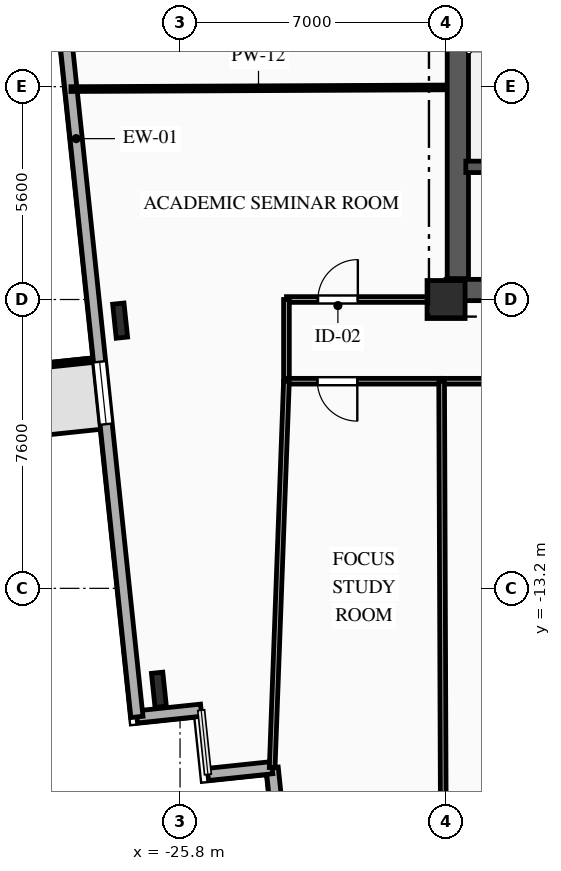
"""IFC4 building model, lengths in metres.
Left out: names, types, materials, properties, quantities, classifications, styles, units other than length and angle.
Written with IfcOpenShell. Run it as: python <this file> out.ifc"""

import sys

from ifc_helpers import new_model, si_unit, direction, frame, frame_2d, origin, origin_2d, place, context, subcontext, project, spatial, rectangle, i_section, extrude, element, fill, save


model = new_model("IFC4")
c1 = context("Model", 3, precision=1e-05, world=origin(), true_north=direction((0.0, 1.0)))
c2 = subcontext(c1, "Body", "Model", "MODEL_VIEW")
j1 = project(units=[si_unit("LENGTHUNIT", "METRE"), si_unit("PLANEANGLEUNIT", "RADIAN")], contexts=[c1])
p1 = place(None, origin())
s1 = spatial("IfcSite", under=j1, at=p1, CompositionType="ELEMENT")
p2 = place(p1, origin())
s2 = spatial("IfcBuilding", under=s1, at=p2, CompositionType="ELEMENT")
p3 = place(p2, frame((0.0, 0.0, 92.4)))
s3 = spatial("IfcBuildingStorey", under=s2, at=p3, CompositionType="ELEMENT", Elevation=92.4)
p4 = place(p3, frame((-18.8, -5.6, 0.0), z_axis=(0.0, 0.0, 1.0), x_axis=(1.0, 0.0, 0.0)))
e1 = element("IfcColumn", 1, at=p4, inside=s3, PredefinedType="COLUMN", context=c2, shape_type="SweptSolid", body=[
    extrude(rectangle(XDim=1.0, YDim=1.0, at=origin_2d()), origin(), (0.0, 0.0, 1.0), 3.35),
])
for number, where, z_axis, x_axis in (
    (2, (-27.377, -6.156, 0.0), (0.0, 0.0, 1.0), (0.995, 0.105, 0.0)),
    (3, (-26.356, -15.869, 0.0), (0.0, 0.0, 1.0), (0.995, 0.105, 0.0)),
):
    element("IfcColumn", number, at=place(p3, frame(where, z_axis=z_axis, x_axis=x_axis)), inside=s3, PredefinedType="COLUMN", context=c2, shape_type="SweptSolid", body=[
        extrude(i_section(OverallWidth=0.3, OverallDepth=0.9, WebThickness=0.019, FlangeThickness=0.035, FilletRadius=0.03, at=origin_2d()), origin(), (0.0, 0.0, 1.0), 3.35),
    ])
for number, where, z_axis, x_axis in (
    (4, (-23.198, -19.609, 0.0), (0.0, 0.0, 1.0), (-0.105, 0.995, 0.0)),
    (5, (-23.376, -17.919, 0.0), (0.0, 0.0, 1.0), (-0.995, -0.105, 0.0)),
):
    element("IfcWall", number, at=place(p3, frame(where, z_axis=z_axis, x_axis=x_axis)), inside=s3, PredefinedType="SOLIDWALL", context=c2, shape_type="SweptSolid", body=[
        extrude(rectangle(XDim=1.7, YDim=0.32, at=frame_2d((0.85, 0.0))), origin(), (0.0, 0.0, 1.0), 3.045),
    ])
p5 = place(p3, frame((-25.244, -16.406, 0.0), z_axis=(0.0, 0.0, 1.0), x_axis=(-0.994521177842, -0.104535289845, 0.0)))
e6 = element("IfcWall", 6, at=p5, inside=s3, PredefinedType="SOLIDWALL", context=c2, shape_type="SweptSolid", body=[
    extrude(rectangle(XDim=1.7, YDim=0.32, at=frame_2d((0.85, 0.0))), origin(), (0.0, 0.0, 1.0), 3.045),
])
p6 = place(p3, frame((-26.935, -16.583, 0.0), z_axis=(0.0, 0.0, 1.0), x_axis=(-0.104524887486, 0.994522271192, 0.0)))
e7 = element("IfcWall", 7, at=p6, inside=s3, PredefinedType="SOLIDWALL", context=c2, shape_type="SweptSolid", body=[
    extrude(rectangle(XDim=30.6, YDim=0.32, at=frame_2d((15.3, 0.0))), origin(), (0.0, 0.0, 1.0), 3.045),
])
p7 = place(p6, frame((7.746, 0.0, 0.85)))
e8 = element("IfcOpeningElement", 8, at=p7, cuts=e7, PredefinedType="OPENING", context=c2, shape_type="SweptSolid", body=[
    extrude(rectangle(XDim=1.65, YDim=1.85, at=frame_2d((0.825, 0.925))), frame((0.0, 0.17, 0.0), z_axis=(0.0, -1.0, 0.0), x_axis=(1.0, 0.0, 0.0)), (0.0, 0.0, 1.0), 0.34),
])
p8 = place(p6, frame((22.631, 0.0, 0.85)))
e9 = element("IfcOpeningElement", 9, at=p8, cuts=e7, PredefinedType="OPENING", context=c2, shape_type="SweptSolid", body=[
    extrude(rectangle(XDim=1.6, YDim=1.85, at=frame_2d((0.8, 0.925))), frame((0.0, 0.17, 0.0), z_axis=(0.0, -1.0, 0.0), x_axis=(1.0, 0.0, 0.0)), (0.0, 0.0, 1.0), 0.34),
])
p9 = place(p3, frame((30.307, -13.986, 0.0), z_axis=(0.0, 0.0, 1.0), x_axis=(-0.994521628355, -0.104531003701, 0.0)))
e10 = element("IfcWall", 10, at=p9, inside=s3, PredefinedType="SOLIDWALL", context=c2, shape_type="SweptSolid", body=[
    extrude(rectangle(XDim=53.8, YDim=0.32, at=frame_2d((26.9, 0.0))), origin(), (0.0, 0.0, 1.0), 3.045),
])
p10 = place(p9, frame((1.657, 0.0, 0.85)))
e11 = element("IfcOpeningElement", 11, at=p10, cuts=e10, PredefinedType="OPENING", context=c2, shape_type="SweptSolid", body=[
    extrude(rectangle(XDim=1.65, YDim=1.85, at=frame_2d((0.825, 0.925))), frame((0.0, 0.17, 0.0), z_axis=(0.0, -1.0, 0.0), x_axis=(1.0, 0.0, 0.0)), (0.0, 0.0, 1.0), 0.34),
])
p11 = place(p9, frame((5.099, 0.0, 0.85)))
e12 = element("IfcOpeningElement", 12, at=p11, cuts=e10, PredefinedType="OPENING", context=c2, shape_type="SweptSolid", body=[
    extrude(rectangle(XDim=1.65, YDim=1.85, at=frame_2d((0.825, 0.925))), frame((0.0, 0.17, 0.0), z_axis=(0.0, -1.0, 0.0), x_axis=(1.0, 0.0, 0.0)), (0.0, 0.0, 1.0), 0.34),
])
p12 = place(p9, frame((10.143, 0.0, 0.85)))
e13 = element("IfcOpeningElement", 13, at=p12, cuts=e10, PredefinedType="OPENING", context=c2, shape_type="SweptSolid", body=[
    extrude(rectangle(XDim=1.65, YDim=1.85, at=frame_2d((0.825, 0.925))), frame((0.0, 0.17, 0.0), z_axis=(0.0, -1.0, 0.0), x_axis=(1.0, 0.0, 0.0)), (0.0, 0.0, 1.0), 0.34),
])
p13 = place(p9, frame((17.314, 0.0, 0.85)))
e14 = element("IfcOpeningElement", 14, at=p13, cuts=e10, PredefinedType="OPENING", context=c2, shape_type="SweptSolid", body=[
    extrude(rectangle(XDim=2.2, YDim=1.85, at=frame_2d((1.1, 0.925))), frame((0.0, 0.17, 0.0), z_axis=(0.0, -1.0, 0.0), x_axis=(1.0, 0.0, 0.0)), (0.0, 0.0, 1.0), 0.34),
])
p14 = place(p9, frame((25.0, 0.0, 0.85)))
e15 = element("IfcOpeningElement", 15, at=p14, cuts=e10, PredefinedType="OPENING", context=c2, shape_type="SweptSolid", body=[
    extrude(rectangle(XDim=2.2, YDim=1.85, at=frame_2d((1.1, 0.925))), frame((0.0, 0.17, 0.0), z_axis=(0.0, -1.0, 0.0), x_axis=(1.0, 0.0, 0.0)), (0.0, 0.0, 1.0), 0.34),
])
p15 = place(p9, frame((32.685, 0.0, 0.85)))
e16 = element("IfcOpeningElement", 16, at=p15, cuts=e10, PredefinedType="OPENING", context=c2, shape_type="SweptSolid", body=[
    extrude(rectangle(XDim=2.2, YDim=1.85, at=frame_2d((1.1, 0.925))), frame((0.0, 0.17, 0.0), z_axis=(0.0, -1.0, 0.0), x_axis=(1.0, 0.0, 0.0)), (0.0, 0.0, 1.0), 0.34),
])
p16 = place(p9, frame((40.411, 0.0, 0.85)))
e17 = element("IfcOpeningElement", 17, at=p16, cuts=e10, PredefinedType="OPENING", context=c2, shape_type="SweptSolid", body=[
    extrude(rectangle(XDim=2.2, YDim=1.85, at=frame_2d((1.1, 0.925))), frame((0.0, 0.17, 0.0), z_axis=(0.0, -1.0, 0.0), x_axis=(1.0, 0.0, 0.0)), (0.0, 0.0, 1.0), 0.34),
])
p17 = place(p9, frame((46.61, 0.0, 0.85)))
e18 = element("IfcOpeningElement", 18, at=p17, cuts=e10, PredefinedType="OPENING", context=c2, shape_type="SweptSolid", body=[
    extrude(rectangle(XDim=1.65, YDim=1.85, at=frame_2d((0.825, 0.925))), frame((0.0, 0.17, 0.0), z_axis=(0.0, -1.0, 0.0), x_axis=(1.0, 0.0, 0.0)), (0.0, 0.0, 1.0), 0.34),
])
p18 = place(p9, frame((50.613, 0.0, 0.85)))
e19 = element("IfcOpeningElement", 19, at=p18, cuts=e10, PredefinedType="OPENING", context=c2, shape_type="SweptSolid", body=[
    extrude(rectangle(XDim=1.65, YDim=1.85, at=frame_2d((0.825, 0.925))), frame((0.0, 0.17, 0.0), z_axis=(0.0, -1.0, 0.0), x_axis=(1.0, 0.0, 0.0)), (0.0, 0.0, 1.0), 0.34),
])
p19 = place(p3, frame((-18.8, -5.35, 0.0), z_axis=(0.0, 0.0, 1.0), x_axis=(1.0, 0.0, 0.0)))
e20 = element("IfcWall", 20, at=p19, inside=s3, PredefinedType="SHEAR", context=c2, shape_type="SweptSolid", body=[
    extrude(rectangle(XDim=9.6, YDim=0.56, at=frame_2d((4.8, 0.0))), origin(), (0.0, 0.0, 1.0), 3.045),
])
p20 = place(p19, frame((1.05, 0.0, 0.0)))
e21 = element("IfcOpeningElement", 21, at=p20, cuts=e20, PredefinedType="OPENING", context=c2, shape_type="SweptSolid", body=[
    extrude(rectangle(XDim=0.9, YDim=2.1, at=frame_2d((0.45, 1.05))), frame((0.0, 0.29, 0.0), z_axis=(0.0, -1.0, 0.0), x_axis=(1.0, 0.0, 0.0)), (0.0, 0.0, 1.0), 0.58),
])
p21 = place(p3, frame((-18.49, -5.05, 0.0), z_axis=(0.0, 0.0, 1.0), x_axis=(0.0, 1.0, 0.0)))
e22 = element("IfcWall", 22, at=p21, inside=s3, PredefinedType="SHEAR", context=c2, shape_type="SweptSolid", body=[
    extrude(rectangle(XDim=10.1, YDim=0.56, at=frame_2d((5.05, 0.0))), origin(), (0.0, 0.0, 1.0), 3.045),
])
p22 = place(p3, frame((-18.28, -2.11, 0.0), z_axis=(0.0, 0.0, 1.0), x_axis=(1.0, 0.0, 0.0)))
e23 = element("IfcWall", 23, at=p22, inside=s3, PredefinedType="SHEAR", context=c2, shape_type="SweptSolid", body=[
    extrude(rectangle(XDim=3.18, YDim=0.3, at=frame_2d((1.59, 0.0))), origin(), (0.0, 0.0, 1.0), 3.045),
])
p23 = place(p3, frame((-23.0, -5.6, 0.0), z_axis=(0.0, 0.0, 1.0), x_axis=(1.0, 0.0, 0.0)))
e24 = element("IfcWall", 24, at=p23, inside=s3, PredefinedType="PARTITIONING", context=c2, shape_type="SweptSolid", body=[
    extrude(rectangle(XDim=4.2, YDim=0.15, at=frame_2d((2.1, 0.0))), origin(), (0.0, 0.0, 1.0), 3.045),
])
p24 = place(p23, frame((0.829, 0.0, 0.0)))
e25 = element("IfcOpeningElement", 25, at=p24, cuts=e24, PredefinedType="OPENING", context=c2, shape_type="SweptSolid", body=[
    extrude(rectangle(XDim=1.05, YDim=2.15, at=frame_2d((0.525, 1.075))), frame((0.0, 0.085, 0.0), z_axis=(0.0, -1.0, 0.0), x_axis=(1.0, 0.0, 0.0)), (0.0, 0.0, 1.0), 0.17),
])
p25 = place(p3, frame((-23.0, -7.75, 0.0), z_axis=(0.0, 0.0, 1.0), x_axis=(0.0, 1.0, 0.0)))
e26 = element("IfcWall", 26, at=p25, inside=s3, PredefinedType="PARTITIONING", context=c2, shape_type="SweptSolid", body=[
    extrude(rectangle(XDim=2.15, YDim=0.15, at=frame_2d((1.075, 0.0))), origin(), (0.0, 0.0, 1.0), 2.7),
])
p26 = place(p3, frame((-18.917, -7.75, 0.0), z_axis=(0.0, 0.0, 1.0), x_axis=(-1.0, 0.0, 0.0)))
e27 = element("IfcWall", 27, at=p26, inside=s3, PredefinedType="PARTITIONING", context=c2, shape_type="SweptSolid", body=[
    extrude(rectangle(XDim=4.083, YDim=0.15, at=frame_2d((2.042, 0.0))), origin(), (0.0, 0.0, 1.0), 3.045),
])
p27 = place(p26, frame((2.219, 0.0, 0.0)))
e28 = element("IfcOpeningElement", 28, at=p27, cuts=e27, PredefinedType="OPENING", context=c2, shape_type="SweptSolid", body=[
    extrude(rectangle(XDim=1.05, YDim=2.15, at=frame_2d((0.525, 1.075))), frame((0.0, 0.085, 0.0), z_axis=(0.0, -1.0, 0.0), x_axis=(1.0, 0.0, 0.0)), (0.0, 0.0, 1.0), 0.17),
])
p28 = place(p3, frame((-14.833, -7.75, 0.0), z_axis=(0.0, 0.0, 1.0), x_axis=(-1.0, 0.0, 0.0)))
e29 = element("IfcWall", 29, at=p28, inside=s3, PredefinedType="PARTITIONING", context=c2, shape_type="SweptSolid", body=[
    extrude(rectangle(XDim=4.083, YDim=0.15, at=frame_2d((2.042, 0.0))), origin(), (0.0, 0.0, 1.0), 3.045),
])
p29 = place(p28, frame((0.814, 0.0, 0.0)))
e30 = element("IfcOpeningElement", 30, at=p29, cuts=e29, PredefinedType="OPENING", context=c2, shape_type="SweptSolid", body=[
    extrude(rectangle(XDim=1.05, YDim=2.15, at=frame_2d((0.525, 1.075))), frame((0.0, 0.085, 0.0), z_axis=(0.0, -1.0, 0.0), x_axis=(1.0, 0.0, 0.0)), (0.0, 0.0, 1.0), 0.17),
])
p30 = place(p3, frame((-28.671, -0.064, 0.0), z_axis=(0.0, 0.0, 1.0), x_axis=(0.999990089865, 0.004451985263, 0.0)))
e31 = element("IfcWall", 31, at=p30, inside=s3, PredefinedType="PARTITIONING", context=c2, shape_type="SweptSolid", body=[
    extrude(rectangle(XDim=9.871, YDim=0.125, at=frame_2d((4.936, 0.0))), origin(), (0.0, 0.0, 1.0), 3.045),
])
p31 = place(p3, frame((-23.0, -7.75, 0.0), z_axis=(0.0, 0.0, 1.0), x_axis=(-0.036924695214, -0.999318050914, 0.0)))
e32 = element("IfcWall", 32, at=p31, inside=s3, PredefinedType="PARTITIONING", context=c2, shape_type="SweptSolid", body=[
    extrude(rectangle(XDim=10.176, YDim=0.15, at=frame_2d((5.088, 0.0))), origin(), (0.0, 0.0, 1.0), 3.045),
])
p32 = place(p3, frame((-18.917, -7.75, 0.0), z_axis=(0.0, 0.0, 1.0), x_axis=(0.003853205971, -0.999992576374, 0.0)))
e33 = element("IfcWall", 33, at=p32, inside=s3, PredefinedType="PARTITIONING", context=c2, shape_type="SweptSolid", body=[
    extrude(rectangle(XDim=11.405, YDim=0.15, at=frame_2d((5.702, 0.0))), origin(), (0.0, 0.0, 1.0), 3.045),
])
p33 = place(p7, origin())
e34 = element("IfcWindow", 34, at=p33, inside=s3, PartitioningType="SINGLE_PANEL", PredefinedType="WINDOW", context=c2, shape_type="SweptSolid", body=[
    extrude(rectangle(XDim=1.65, YDim=1.85, at=frame_2d((0.825, 0.925))), frame((0.0, 0.03, 0.0), z_axis=(0.0, -1.0, 0.0), x_axis=(1.0, 0.0, 0.0)), (0.0, 0.0, 1.0), 0.06),
])
fill(e8, e34)
p34 = place(p24, origin())
e35 = element("IfcDoor", 35, at=p34, inside=s3, OperationType="SINGLE_SWING_RIGHT", PredefinedType="DOOR", context=c2, shape_type="SweptSolid", body=[
    extrude(rectangle(XDim=1.05, YDim=2.15, at=frame_2d((0.525, 1.075))), frame((0.0, 0.025, 0.0), z_axis=(0.0, -1.0, 0.0), x_axis=(1.0, 0.0, 0.0)), (0.0, 0.0, 1.0), 0.05),
])
fill(e25, e35)
p35 = place(p27, origin())
e36 = element("IfcDoor", 36, at=p35, inside=s3, OperationType="SINGLE_SWING_LEFT", PredefinedType="DOOR", context=c2, shape_type="SweptSolid", body=[
    extrude(rectangle(XDim=1.05, YDim=2.15, at=frame_2d((0.525, 1.075))), frame((0.0, 0.025, 0.0), z_axis=(0.0, -1.0, 0.0), x_axis=(1.0, 0.0, 0.0)), (0.0, 0.0, 1.0), 0.05),
])
fill(e28, e36)
save(model, sys.argv[1])
